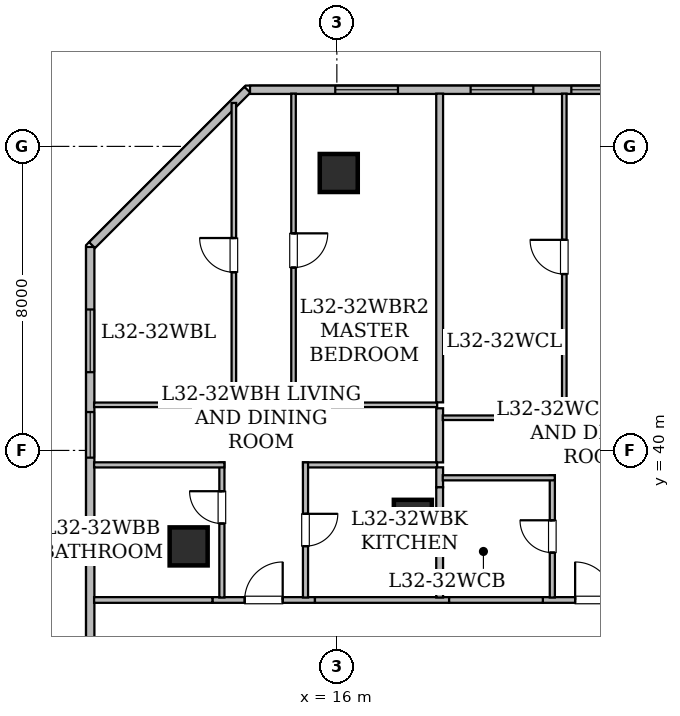
"""IFC4 building model, lengths in metres.
Left out: names, types, materials, properties, quantities, classifications, styles, units other than length and angle.
Written with IfcOpenShell. Run it as: python <this file> out.ifc"""

import sys

from ifc_helpers import new_model, si_unit, direction, frame, frame_2d, origin, origin_2d, place, context, subcontext, project, spatial, rectangle, hollow_rectangle, extrude, element, fill, save


model = new_model("IFC4")
c1 = context("Model", 3, precision=1e-05, world=origin(), true_north=direction((0.0, 1.0)))
c2 = subcontext(c1, "Body", "Model", "MODEL_VIEW")
j1 = project(units=[si_unit("LENGTHUNIT", "METRE"), si_unit("PLANEANGLEUNIT", "RADIAN")], contexts=[c1])
p1 = place(None, origin())
s1 = spatial("IfcSite", under=j1, at=p1, CompositionType="ELEMENT")
p2 = place(p1, origin())
s2 = spatial("IfcBuilding", under=s1, at=p2, CompositionType="ELEMENT")
p3 = place(p2, frame((0.0, 0.0, 127.45)))
s3 = spatial("IfcBuildingStorey", under=s2, at=p3, CompositionType="ELEMENT", Elevation=127.45)
for number, where, z_axis, x_axis in (
    (1, (16.05, 47.3, 0.0), (0.0, 0.0, 1.0), (1.0, 0.0, 0.0)),
    (2, (12.1, 37.475, 0.0), (0.0, 0.0, 1.0), (1.0, 0.0, 0.0)),
    (3, (18.0, 38.2, 0.0), (0.0, 0.0, 1.0), (1.0, 0.0, 0.0)),
):
    element("IfcColumn", number, at=place(p3, frame(where, z_axis=z_axis, x_axis=x_axis)), inside=s3, PredefinedType="COLUMN", context=c2, shape_type="SweptSolid", body=[
        extrude(hollow_rectangle(XDim=1.0, YDim=1.0, WallThickness=0.05, at=origin_2d()), origin(), (0.0, 0.0, 1.0), 3.65),
    ])
p4 = place(p3, frame((9.51, 31.293, 0.0), z_axis=(0.0, 0.0, 1.0), x_axis=(0.0, 1.0, 0.0)))
e4 = element("IfcWall", 4, at=p4, inside=s3, PredefinedType="STANDARD", context=c2, shape_type="SweptSolid", body=[
    extrude(rectangle(XDim=14.061, YDim=0.22, at=frame_2d((7.031, 0.0))), origin(), (0.0, 0.0, 1.0), 3.43),
])
p5 = place(p4, frame((8.517, 0.0, 0.8)))
e5 = element("IfcOpeningElement", 5, at=p5, cuts=e4, PredefinedType="OPENING", context=c2, shape_type="SweptSolid", body=[
    extrude(rectangle(XDim=1.2, YDim=1.5, at=frame_2d((0.6, 0.75))), frame((0.0, 0.12, 0.0), z_axis=(0.0, -1.0, 0.0), x_axis=(1.0, 0.0, 0.0)), (0.0, 0.0, 1.0), 0.24),
])
p6 = place(p4, frame((10.766, 0.0, 0.85)))
e6 = element("IfcOpeningElement", 6, at=p6, cuts=e4, PredefinedType="OPENING", context=c2, shape_type="SweptSolid", body=[
    extrude(rectangle(XDim=1.65, YDim=1.55, at=frame_2d((0.825, 0.775))), frame((0.0, 0.12, 0.0), z_axis=(0.0, -1.0, 0.0), x_axis=(1.0, 0.0, 0.0)), (0.0, 0.0, 1.0), 0.24),
])
p7 = place(p3, frame((9.558, 45.402, 0.0), z_axis=(0.0, 0.0, 1.0), x_axis=(0.707106781187, 0.707106781187, 0.0)))
e7 = element("IfcWall", 7, at=p7, inside=s3, PredefinedType="STANDARD", context=c2, shape_type="SweptSolid", body=[
    extrude(rectangle(XDim=5.781, YDim=0.22, at=frame_2d((2.891, 0.0))), origin(), (0.0, 0.0, 1.0), 3.43),
])
p8 = place(p3, frame((13.715, 49.49, 0.0), z_axis=(0.0, 0.0, 1.0), x_axis=(1.0, 0.0, 0.0)))
e8 = element("IfcWall", 8, at=p8, inside=s3, PredefinedType="STANDARD", context=c2, shape_type="SweptSolid", body=[
    extrude(rectangle(XDim=38.639, YDim=0.22, at=frame_2d((19.319, 0.0))), origin(), (0.0, 0.0, 1.0), 3.43),
])
p9 = place(p8, frame((2.243, 0.0, 0.85)))
e9 = element("IfcOpeningElement", 9, at=p9, cuts=e8, PredefinedType="OPENING", context=c2, shape_type="SweptSolid", body=[
    extrude(rectangle(XDim=1.65, YDim=1.55, at=frame_2d((0.825, 0.775))), frame((0.0, 0.12, 0.0), z_axis=(0.0, -1.0, 0.0), x_axis=(1.0, 0.0, 0.0)), (0.0, 0.0, 1.0), 0.24),
])
p10 = place(p8, frame((8.455, 0.0, 0.8)))
e10 = element("IfcOpeningElement", 10, at=p10, cuts=e8, PredefinedType="OPENING", context=c2, shape_type="SweptSolid", body=[
    extrude(rectangle(XDim=1.2, YDim=1.5, at=frame_2d((0.6, 0.75))), frame((0.0, 0.12, 0.0), z_axis=(0.0, -1.0, 0.0), x_axis=(1.0, 0.0, 0.0)), (0.0, 0.0, 1.0), 0.24),
])
p11 = place(p8, frame((5.805, 0.0, 0.85)))
e11 = element("IfcOpeningElement", 11, at=p11, cuts=e8, PredefinedType="OPENING", context=c2, shape_type="SweptSolid", body=[
    extrude(rectangle(XDim=1.65, YDim=1.55, at=frame_2d((0.825, 0.775))), frame((0.0, 0.12, 0.0), z_axis=(0.0, -1.0, 0.0), x_axis=(1.0, 0.0, 0.0)), (0.0, 0.0, 1.0), 0.24),
])
p12 = place(p8, frame((10.655, 0.0, 0.85)))
e12 = element("IfcOpeningElement", 12, at=p12, cuts=e8, PredefinedType="OPENING", context=c2, shape_type="SweptSolid", body=[
    extrude(rectangle(XDim=1.65, YDim=1.55, at=frame_2d((0.825, 0.775))), frame((0.0, 0.12, 0.0), z_axis=(0.0, -1.0, 0.0), x_axis=(1.0, 0.0, 0.0)), (0.0, 0.0, 1.0), 0.24),
])
p13 = place(p8, frame((15.556, 0.0, 0.85)))
e13 = element("IfcOpeningElement", 13, at=p13, cuts=e8, PredefinedType="OPENING", context=c2, shape_type="SweptSolid", body=[
    extrude(rectangle(XDim=1.65, YDim=1.55, at=frame_2d((0.825, 0.775))), frame((0.0, 0.12, 0.0), z_axis=(0.0, -1.0, 0.0), x_axis=(1.0, 0.0, 0.0)), (0.0, 0.0, 1.0), 0.24),
])
p14 = place(p8, frame((22.821, 0.0, 0.85)))
e14 = element("IfcOpeningElement", 14, at=p14, cuts=e8, PredefinedType="OPENING", context=c2, shape_type="SweptSolid", body=[
    extrude(rectangle(XDim=1.65, YDim=1.55, at=frame_2d((0.825, 0.775))), frame((0.0, 0.12, 0.0), z_axis=(0.0, -1.0, 0.0), x_axis=(1.0, 0.0, 0.0)), (0.0, 0.0, 1.0), 0.24),
])
p15 = place(p8, frame((32.239, 0.0, 0.85)))
e15 = element("IfcOpeningElement", 15, at=p15, cuts=e8, PredefinedType="OPENING", context=c2, shape_type="SweptSolid", body=[
    extrude(rectangle(XDim=1.65, YDim=1.55, at=frame_2d((0.825, 0.775))), frame((0.0, 0.12, 0.0), z_axis=(0.0, -1.0, 0.0), x_axis=(1.0, 0.0, 0.0)), (0.0, 0.0, 1.0), 0.24),
])
p16 = place(p8, frame((28.676, 0.0, 0.85)))
e16 = element("IfcOpeningElement", 16, at=p16, cuts=e8, PredefinedType="OPENING", context=c2, shape_type="SweptSolid", body=[
    extrude(rectangle(XDim=1.65, YDim=1.55, at=frame_2d((0.825, 0.775))), frame((0.0, 0.12, 0.0), z_axis=(0.0, -1.0, 0.0), x_axis=(1.0, 0.0, 0.0)), (0.0, 0.0, 1.0), 0.24),
])
p17 = place(p8, frame((35.489, 0.0, 0.85)))
e17 = element("IfcOpeningElement", 17, at=p17, cuts=e8, PredefinedType="OPENING", context=c2, shape_type="SweptSolid", body=[
    extrude(rectangle(XDim=1.65, YDim=1.55, at=frame_2d((0.825, 0.775))), frame((0.0, 0.12, 0.0), z_axis=(0.0, -1.0, 0.0), x_axis=(1.0, 0.0, 0.0)), (0.0, 0.0, 1.0), 0.24),
])
p18 = place(p3, frame((12.726, 36.065, 0.0), z_axis=(0.0, 0.0, 1.0), x_axis=(1.0, 0.0, 0.0)))
e18 = element("IfcWall", 18, at=p18, inside=s3, PredefinedType="STANDARD", context=c2, shape_type="SweptSolid", body=[
    extrude(rectangle(XDim=2.698, YDim=0.15, at=frame_2d((1.349, 0.0))), origin(), (0.0, 0.0, 1.0), 3.43),
])
p19 = place(p18, frame((0.849, 0.0, 0.0)))
e19 = element("IfcOpeningElement", 19, at=p19, cuts=e18, PredefinedType="OPENING", context=c2, shape_type="SweptSolid", body=[
    extrude(rectangle(XDim=1.0, YDim=2.15, at=frame_2d((0.5, 1.075))), frame((0.0, 0.085, 0.0), z_axis=(0.0, -1.0, 0.0), x_axis=(1.0, 0.0, 0.0)), (0.0, 0.0, 1.0), 0.17),
])
p20 = place(p3, frame((9.612, 36.065, 0.0), z_axis=(0.0, 0.0, 1.0), x_axis=(1.0, 0.0, 0.0)))
e20 = element("IfcWall", 20, at=p20, inside=s3, PredefinedType="STANDARD", context=c2, shape_type="SweptSolid", body=[
    extrude(rectangle(XDim=3.114, YDim=0.15, at=frame_2d((1.557, 0.0))), origin(), (0.0, 0.0, 1.0), 2.876),
])
p21 = place(p3, frame((15.424, 36.065, 0.0), z_axis=(0.0, 0.0, 1.0), x_axis=(1.0, 0.0, 0.0)))
e21 = element("IfcWall", 21, at=p21, inside=s3, PredefinedType="STANDARD", context=c2, shape_type="SweptSolid", body=[
    extrude(rectangle(XDim=3.53, YDim=0.15, at=frame_2d((1.765, 0.0))), origin(), (0.0, 0.0, 1.0), 2.647),
])
p22 = place(p3, frame((21.421, 36.065, 0.0), z_axis=(0.0, 0.0, 1.0), x_axis=(1.0, 0.0, 0.0)))
e22 = element("IfcWall", 22, at=p22, inside=s3, PredefinedType="STANDARD", context=c2, shape_type="SweptSolid", body=[
    extrude(rectangle(XDim=2.698, YDim=0.15, at=frame_2d((1.349, 0.0))), origin(), (0.0, 0.0, 1.0), 3.43),
])
p23 = place(p22, frame((0.849, 0.0, 0.0)))
e23 = element("IfcOpeningElement", 23, at=p23, cuts=e22, PredefinedType="OPENING", context=c2, shape_type="SweptSolid", body=[
    extrude(rectangle(XDim=1.0, YDim=2.15, at=frame_2d((0.5, 1.075))), frame((0.0, 0.085, 0.0), z_axis=(0.0, -1.0, 0.0), x_axis=(1.0, 0.0, 0.0)), (0.0, 0.0, 1.0), 0.17),
])
p24 = place(p3, frame((18.954, 36.065, 0.0), z_axis=(0.0, 0.0, 1.0), x_axis=(1.0, 0.0, 0.0)))
e24 = element("IfcWall", 24, at=p24, inside=s3, PredefinedType="STANDARD", context=c2, shape_type="SweptSolid", body=[
    extrude(rectangle(XDim=2.467, YDim=0.15, at=frame_2d((1.233, 0.0))), origin(), (0.0, 0.0, 1.0), 3.43),
])
p25 = place(p3, frame((12.975, 36.13, 0.0), z_axis=(0.0, 0.0, 1.0), x_axis=(0.0, 1.0, 0.0)))
e25 = element("IfcWall", 25, at=p25, inside=s3, PredefinedType="PARTITIONING", context=c2, shape_type="SweptSolid", body=[
    extrude(rectangle(XDim=3.555, YDim=0.135, at=frame_2d((1.778, 0.0))), origin(), (0.0, 0.0, 1.0), 2.647),
])
p26 = place(p25, frame((1.947, 0.0, 0.0)))
e26 = element("IfcOpeningElement", 26, at=p26, cuts=e25, PredefinedType="OPENING", context=c2, shape_type="SweptSolid", body=[
    extrude(rectangle(XDim=0.85, YDim=2.1, at=frame_2d((0.425, 1.05))), frame((0.0, 0.077, 0.0), z_axis=(0.0, -1.0, 0.0), x_axis=(1.0, 0.0, 0.0)), (0.0, 0.0, 1.0), 0.155),
])
p27 = place(p3, frame((13.04, 39.62, 0.0), z_axis=(0.0, 0.0, 1.0), x_axis=(-1.0, 0.0, 0.0)))
e27 = element("IfcWall", 27, at=p27, inside=s3, PredefinedType="PARTITIONING", context=c2, shape_type="SweptSolid", body=[
    extrude(rectangle(XDim=3.428, YDim=0.135, at=frame_2d((1.714, 0.0))), origin(), (0.0, 0.0, 1.0), 2.876),
])
p28 = place(p3, frame((18.64, 39.62, 0.0), z_axis=(0.0, 0.0, 1.0), x_axis=(-1.0, 0.0, 0.0)))
e28 = element("IfcWall", 28, at=p28, inside=s3, PredefinedType="PARTITIONING", context=c2, shape_type="SweptSolid", body=[
    extrude(rectangle(XDim=3.53, YDim=0.135, at=frame_2d((1.765, 0.0))), origin(), (0.0, 0.0, 1.0), 2.647),
])
p29 = place(p3, frame((15.175, 39.685, 0.0), z_axis=(0.0, 0.0, 1.0), x_axis=(0.0, -1.0, 0.0)))
e29 = element("IfcWall", 29, at=p29, inside=s3, PredefinedType="PARTITIONING", context=c2, shape_type="SweptSolid", body=[
    extrude(rectangle(XDim=3.555, YDim=0.135, at=frame_2d((1.778, 0.0))), origin(), (0.0, 0.0, 1.0), 2.647),
])
p30 = place(p29, frame((1.353, 0.0, 0.0)))
e30 = element("IfcOpeningElement", 30, at=p30, cuts=e29, PredefinedType="OPENING", context=c2, shape_type="SweptSolid", body=[
    extrude(rectangle(XDim=0.85, YDim=2.1, at=frame_2d((0.425, 1.05))), frame((0.0, 0.077, 0.0), z_axis=(0.0, -1.0, 0.0), x_axis=(1.0, 0.0, 0.0)), (0.0, 0.0, 1.0), 0.155),
])
p31 = place(p3, frame((9.612, 41.2, 0.0), z_axis=(0.0, 0.0, 1.0), x_axis=(1.0, 0.0, 0.0)))
e31 = element("IfcWall", 31, at=p31, inside=s3, PredefinedType="PARTITIONING", context=c2, shape_type="SweptSolid", body=[
    extrude(rectangle(XDim=3.743, YDim=0.12, at=frame_2d((1.872, 0.0))), origin(), (0.0, 0.0, 1.0), 3.43),
])
p32 = place(p3, frame((13.29, 41.135, 0.0), z_axis=(0.0, 0.0, 1.0), x_axis=(0.0, 1.0, 0.0)))
e32 = element("IfcWall", 32, at=p32, inside=s3, PredefinedType="PARTITIONING", context=c2, shape_type="SweptSolid", body=[
    extrude(rectangle(XDim=8.008, YDim=0.12, at=frame_2d((4.004, 0.0))), origin(), (0.0, 0.0, 1.0), 2.876),
])
p33 = place(p32, frame((3.554, 0.0, 0.0)))
e33 = element("IfcOpeningElement", 33, at=p33, cuts=e32, PredefinedType="OPENING", context=c2, shape_type="SweptSolid", body=[
    extrude(rectangle(XDim=0.9, YDim=2.1, at=frame_2d((0.45, 1.05))), frame((0.0, 0.07, 0.0), z_axis=(0.0, -1.0, 0.0), x_axis=(1.0, 0.0, 0.0)), (0.0, 0.0, 1.0), 0.14),
])
p34 = place(p3, frame((14.86, 49.388, 0.0), z_axis=(0.0, 0.0, 1.0), x_axis=(0.0, -1.0, 0.0)))
e34 = element("IfcWall", 34, at=p34, inside=s3, PredefinedType="PARTITIONING", context=c2, shape_type="SweptSolid", body=[
    extrude(rectangle(XDim=8.253, YDim=0.12, at=frame_2d((4.126, 0.0))), origin(), (0.0, 0.0, 1.0), 2.876),
])
p35 = place(p34, frame((3.676, 0.0, 0.0)))
e35 = element("IfcOpeningElement", 35, at=p35, cuts=e34, PredefinedType="OPENING", context=c2, shape_type="SweptSolid", body=[
    extrude(rectangle(XDim=0.9, YDim=2.1, at=frame_2d((0.45, 1.05))), frame((0.0, 0.07, 0.0), z_axis=(0.0, -1.0, 0.0), x_axis=(1.0, 0.0, 0.0)), (0.0, 0.0, 1.0), 0.14),
])
p36 = place(p3, frame((14.795, 41.2, 0.0), z_axis=(0.0, 0.0, 1.0), x_axis=(1.0, 0.0, 0.0)))
e36 = element("IfcWall", 36, at=p36, inside=s3, PredefinedType="PARTITIONING", context=c2, shape_type="SweptSolid", body=[
    extrude(rectangle(XDim=3.845, YDim=0.12, at=frame_2d((1.922, 0.0))), origin(), (0.0, 0.0, 1.0), 2.647),
])
p37 = place(p3, frame((18.705, 41.109, 0.0), z_axis=(0.0, 0.0, 1.0), x_axis=(0.0, -1.0, 0.0)))
e37 = element("IfcWall", 37, at=p37, inside=s3, PredefinedType="STANDARD", context=c2, shape_type="SweptSolid", body=[
    extrude(rectangle(XDim=1.424, YDim=0.18, at=frame_2d((0.712, 0.0))), origin(), (0.0, 0.0, 1.0), 3.43),
])
p38 = place(p3, frame((18.705, 39.555, 0.0), z_axis=(0.0, 0.0, 1.0), x_axis=(0.0, -1.0, 0.0)))
e38 = element("IfcWall", 38, at=p38, inside=s3, PredefinedType="STANDARD", context=c2, shape_type="SweptSolid", body=[
    extrude(rectangle(XDim=0.524, YDim=0.18, at=frame_2d((0.262, 0.0))), origin(), (0.0, 0.0, 1.0), 3.43),
])
p39 = place(p3, frame((18.705, 39.031, 0.0), z_axis=(0.0, 0.0, 1.0), x_axis=(0.0, -1.0, 0.0)))
e39 = element("IfcWall", 39, at=p39, inside=s3, PredefinedType="STANDARD", context=c2, shape_type="SweptSolid", body=[
    extrude(rectangle(XDim=2.901, YDim=0.18, at=frame_2d((1.451, 0.0))), origin(), (0.0, 0.0, 1.0), 2.647),
])
p40 = place(p3, frame((18.705, 49.388, 0.0), z_axis=(0.0, 0.0, 1.0), x_axis=(0.0, -1.0, 0.0)))
e40 = element("IfcWall", 40, at=p40, inside=s3, PredefinedType="STANDARD", context=c2, shape_type="SweptSolid", body=[
    extrude(rectangle(XDim=8.123, YDim=0.18, at=frame_2d((4.062, 0.0))), origin(), (0.0, 0.0, 1.0), 2.876),
])
p41 = place(p3, frame((21.67, 36.13, 0.0), z_axis=(0.0, 0.0, 1.0), x_axis=(0.0, 1.0, 0.0)))
e41 = element("IfcWall", 41, at=p41, inside=s3, PredefinedType="PARTITIONING", context=c2, shape_type="SweptSolid", body=[
    extrude(rectangle(XDim=3.215, YDim=0.135, at=frame_2d((1.607, 0.0))), origin(), (0.0, 0.0, 1.0), 2.647),
])
p42 = place(p41, frame((1.182, 0.0, 0.0)))
e42 = element("IfcOpeningElement", 42, at=p42, cuts=e41, PredefinedType="OPENING", context=c2, shape_type="SweptSolid", body=[
    extrude(rectangle(XDim=0.85, YDim=2.1, at=frame_2d((0.425, 1.05))), frame((0.0, 0.077, 0.0), z_axis=(0.0, -1.0, 0.0), x_axis=(1.0, 0.0, 0.0)), (0.0, 0.0, 1.0), 0.155),
])
p43 = place(p3, frame((21.735, 39.28, 0.0), z_axis=(0.0, 0.0, 1.0), x_axis=(-1.0, 0.0, 0.0)))
e43 = element("IfcWall", 43, at=p43, inside=s3, PredefinedType="PARTITIONING", context=c2, shape_type="SweptSolid", body=[
    extrude(rectangle(XDim=2.948, YDim=0.135, at=frame_2d((1.474, 0.0))), origin(), (0.0, 0.0, 1.0), 3.43),
])
p44 = place(p3, frame((18.787, 40.86, 0.0), z_axis=(0.0, 0.0, 1.0), x_axis=(1.0, 0.0, 0.0)))
e44 = element("IfcWall", 44, at=p44, inside=s3, PredefinedType="PARTITIONING", context=c2, shape_type="SweptSolid", body=[
    extrude(rectangle(XDim=3.263, YDim=0.12, at=frame_2d((1.631, 0.0))), origin(), (0.0, 0.0, 1.0), 3.43),
])
p45 = place(p3, frame((21.985, 40.795, 0.0), z_axis=(0.0, 0.0, 1.0), x_axis=(0.0, 1.0, 0.0)))
e45 = element("IfcWall", 45, at=p45, inside=s3, PredefinedType="PARTITIONING", context=c2, shape_type="SweptSolid", body=[
    extrude(rectangle(XDim=8.593, YDim=0.12, at=frame_2d((4.296, 0.0))), origin(), (0.0, 0.0, 1.0), 2.876),
])
p46 = place(p45, frame((3.846, 0.0, 0.0)))
e46 = element("IfcOpeningElement", 46, at=p46, cuts=e45, PredefinedType="OPENING", context=c2, shape_type="SweptSolid", body=[
    extrude(rectangle(XDim=0.9, YDim=2.1, at=frame_2d((0.45, 1.05))), frame((0.0, 0.07, 0.0), z_axis=(0.0, -1.0, 0.0), x_axis=(1.0, 0.0, 0.0)), (0.0, 0.0, 1.0), 0.14),
])
p47 = place(p5, origin())
e47 = element("IfcWindow", 47, at=p47, inside=s3, PartitioningType="SINGLE_PANEL", PredefinedType="WINDOW", context=c2, shape_type="SweptSolid", body=[
    extrude(rectangle(XDim=1.2, YDim=1.5, at=frame_2d((0.6, 0.75))), frame((0.0, 0.03, 0.0), z_axis=(0.0, -1.0, 0.0), x_axis=(1.0, 0.0, 0.0)), (0.0, 0.0, 1.0), 0.06),
])
fill(e5, e47)
p48 = place(p6, origin())
e48 = element("IfcWindow", 48, at=p48, inside=s3, PartitioningType="SINGLE_PANEL", PredefinedType="WINDOW", context=c2, shape_type="SweptSolid", body=[
    extrude(rectangle(XDim=1.65, YDim=1.55, at=frame_2d((0.825, 0.775))), frame((0.0, 0.03, 0.0), z_axis=(0.0, -1.0, 0.0), x_axis=(1.0, 0.0, 0.0)), (0.0, 0.0, 1.0), 0.06),
])
fill(e6, e48)
p49 = place(p9, origin())
e49 = element("IfcWindow", 49, at=p49, inside=s3, PartitioningType="SINGLE_PANEL", PredefinedType="WINDOW", context=c2, shape_type="SweptSolid", body=[
    extrude(rectangle(XDim=1.65, YDim=1.55, at=frame_2d((0.825, 0.775))), frame((0.0, 0.03, 0.0), z_axis=(0.0, -1.0, 0.0), x_axis=(1.0, 0.0, 0.0)), (0.0, 0.0, 1.0), 0.06),
])
fill(e9, e49)
p50 = place(p10, origin())
e50 = element("IfcWindow", 50, at=p50, inside=s3, PartitioningType="SINGLE_PANEL", PredefinedType="WINDOW", context=c2, shape_type="SweptSolid", body=[
    extrude(rectangle(XDim=1.2, YDim=1.5, at=frame_2d((0.6, 0.75))), frame((0.0, 0.03, 0.0), z_axis=(0.0, -1.0, 0.0), x_axis=(1.0, 0.0, 0.0)), (0.0, 0.0, 1.0), 0.06),
])
fill(e10, e50)
p51 = place(p11, origin())
e51 = element("IfcWindow", 51, at=p51, inside=s3, PartitioningType="SINGLE_PANEL", PredefinedType="WINDOW", context=c2, shape_type="SweptSolid", body=[
    extrude(rectangle(XDim=1.65, YDim=1.55, at=frame_2d((0.825, 0.775))), frame((0.0, 0.03, 0.0), z_axis=(0.0, -1.0, 0.0), x_axis=(1.0, 0.0, 0.0)), (0.0, 0.0, 1.0), 0.06),
])
fill(e11, e51)
p52 = place(p19, origin())
e52 = element("IfcDoor", 52, at=p52, inside=s3, OperationType="SINGLE_SWING_RIGHT", PredefinedType="DOOR", context=c2, shape_type="SweptSolid", body=[
    extrude(rectangle(XDim=1.0, YDim=2.15, at=frame_2d((0.5, 1.075))), frame((0.0, 0.025, 0.0), z_axis=(0.0, -1.0, 0.0), x_axis=(1.0, 0.0, 0.0)), (0.0, 0.0, 1.0), 0.05),
])
fill(e19, e52)
p53 = place(p23, origin())
e53 = element("IfcDoor", 53, at=p53, inside=s3, OperationType="SINGLE_SWING_LEFT", PredefinedType="DOOR", context=c2, shape_type="SweptSolid", body=[
    extrude(rectangle(XDim=1.0, YDim=2.15, at=frame_2d((0.5, 1.075))), frame((0.0, 0.025, 0.0), z_axis=(0.0, -1.0, 0.0), x_axis=(1.0, 0.0, 0.0)), (0.0, 0.0, 1.0), 0.05),
])
fill(e23, e53)
p54 = place(p26, origin())
e54 = element("IfcDoor", 54, at=p54, inside=s3, OperationType="SINGLE_SWING_RIGHT", PredefinedType="DOOR", context=c2, shape_type="SweptSolid", body=[
    extrude(rectangle(XDim=0.85, YDim=2.1, at=frame_2d((0.425, 1.05))), frame((0.0, 0.025, 0.0), z_axis=(0.0, -1.0, 0.0), x_axis=(1.0, 0.0, 0.0)), (0.0, 0.0, 1.0), 0.05),
])
fill(e26, e54)
p55 = place(p30, origin())
e55 = element("IfcDoor", 55, at=p55, inside=s3, OperationType="SINGLE_SWING_LEFT", PredefinedType="DOOR", context=c2, shape_type="SweptSolid", body=[
    extrude(rectangle(XDim=0.85, YDim=2.1, at=frame_2d((0.425, 1.05))), frame((0.0, 0.025, 0.0), z_axis=(0.0, -1.0, 0.0), x_axis=(1.0, 0.0, 0.0)), (0.0, 0.0, 1.0), 0.05),
])
fill(e30, e55)
p56 = place(p33, origin())
e56 = element("IfcDoor", 56, at=p56, inside=s3, OperationType="SINGLE_SWING_RIGHT", PredefinedType="DOOR", context=c2, shape_type="SweptSolid", body=[
    extrude(rectangle(XDim=0.9, YDim=2.1, at=frame_2d((0.45, 1.05))), frame((0.0, 0.025, 0.0), z_axis=(0.0, -1.0, 0.0), x_axis=(1.0, 0.0, 0.0)), (0.0, 0.0, 1.0), 0.05),
])
fill(e33, e56)
p57 = place(p35, origin())
e57 = element("IfcDoor", 57, at=p57, inside=s3, OperationType="SINGLE_SWING_LEFT", PredefinedType="DOOR", context=c2, shape_type="SweptSolid", body=[
    extrude(rectangle(XDim=0.9, YDim=2.1, at=frame_2d((0.45, 1.05))), frame((0.0, 0.025, 0.0), z_axis=(0.0, -1.0, 0.0), x_axis=(1.0, 0.0, 0.0)), (0.0, 0.0, 1.0), 0.05),
])
fill(e35, e57)
p58 = place(p42, origin())
e58 = element("IfcDoor", 58, at=p58, inside=s3, OperationType="SINGLE_SWING_RIGHT", PredefinedType="DOOR", context=c2, shape_type="SweptSolid", body=[
    extrude(rectangle(XDim=0.85, YDim=2.1, at=frame_2d((0.425, 1.05))), frame((0.0, 0.025, 0.0), z_axis=(0.0, -1.0, 0.0), x_axis=(1.0, 0.0, 0.0)), (0.0, 0.0, 1.0), 0.05),
])
fill(e42, e58)
p59 = place(p46, origin())
e59 = element("IfcDoor", 59, at=p59, inside=s3, OperationType="SINGLE_SWING_RIGHT", PredefinedType="DOOR", context=c2, shape_type="SweptSolid", body=[
    extrude(rectangle(XDim=0.9, YDim=2.1, at=frame_2d((0.45, 1.05))), frame((0.0, 0.025, 0.0), z_axis=(0.0, -1.0, 0.0), x_axis=(1.0, 0.0, 0.0)), (0.0, 0.0, 1.0), 0.05),
])
fill(e46, e59)
save(model, sys.argv[1])
